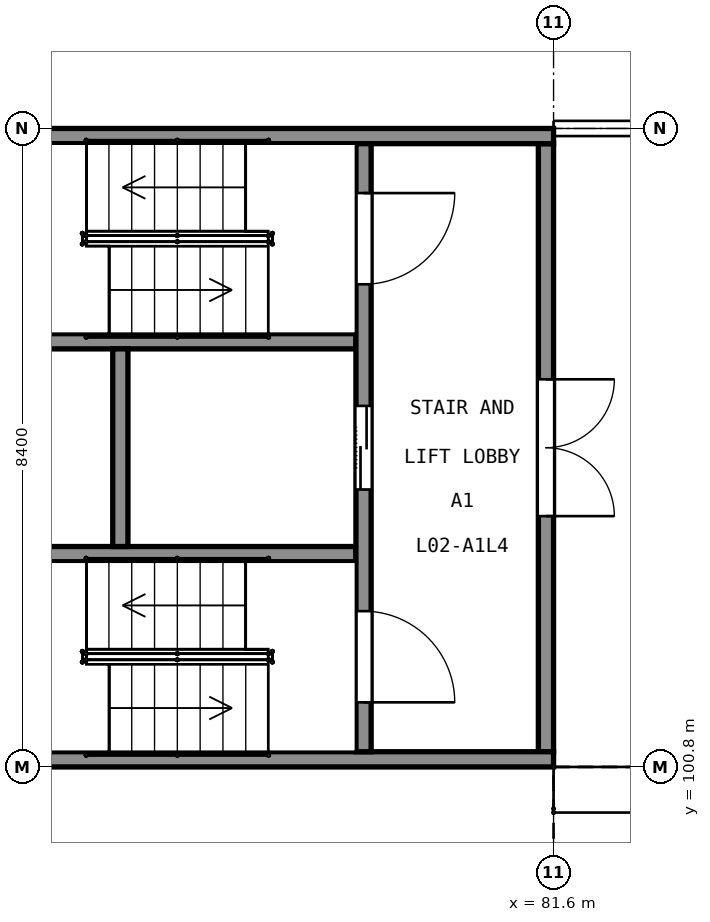
"""IFC4 building model, lengths in metres.
Left out: names, types, materials, properties, quantities, classifications, styles, units other than length and angle.
Written with IfcOpenShell. Run it as: python <this file> out.ifc"""

import sys

from ifc_helpers import new_model, si_unit, direction, frame, frame_2d, origin, place, context, subcontext, project, spatial, rectangle, extrude, element, fill, save


model = new_model("IFC4")
c1 = context("Model", 3, precision=1e-05, world=origin(), true_north=direction((0.0, 1.0)))
c2 = subcontext(c1, "Body", "Model", "MODEL_VIEW")
j1 = project(units=[si_unit("LENGTHUNIT", "METRE"), si_unit("PLANEANGLEUNIT", "RADIAN")], contexts=[c1])
p1 = place(None, origin())
s1 = spatial("IfcSite", under=j1, at=p1, CompositionType="ELEMENT")
p2 = place(p1, origin())
s2 = spatial("IfcBuilding", under=s1, at=p2, CompositionType="ELEMENT")
p3 = place(p2, frame((0.0, 0.0, 10.5)))
s3 = spatial("IfcBuildingStorey", under=s2, at=p3, CompositionType="ELEMENT", Elevation=10.5)
for number, where, z_axis, x_axis in (
    (1, (73.2, 100.9, 0.0), (0.0, 0.0, 1.0), (1.0, 0.0, 0.0)),
    (2, (73.2, 109.1, 0.0), (0.0, 0.0, 1.0), (1.0, 0.0, 0.0)),
):
    element("IfcWall", number, at=place(p3, frame(where, z_axis=z_axis, x_axis=x_axis)), inside=s3, PredefinedType="SHEAR", context=c2, shape_type="SweptSolid", body=[
        extrude(rectangle(XDim=8.4, YDim=0.2, at=frame_2d((4.2, 0.0))), origin(), (0.0, 0.0, 1.0), 9.5),
    ])
p4 = place(p3, frame((81.5, 101.0, 0.0), z_axis=(0.0, 0.0, 1.0), x_axis=(0.0, 1.0, 0.0)))
e3 = element("IfcWall", 3, at=p4, inside=s3, PredefinedType="SHEAR", context=c2, shape_type="SweptSolid", body=[
    extrude(rectangle(XDim=8.0, YDim=0.2, at=frame_2d((4.0, 0.0))), origin(), (0.0, 0.0, 1.0), 9.5),
])
p5 = place(p4, frame((3.1, 0.0, 0.0)))
e4 = element("IfcOpeningElement", 4, at=p5, cuts=e3, PredefinedType="OPENING", context=c2, shape_type="SweptSolid", body=[
    extrude(rectangle(XDim=1.8, YDim=2.1, at=frame_2d((0.9, 1.05))), frame((0.0, 0.11, 0.0), z_axis=(0.0, -1.0, 0.0), x_axis=(1.0, 0.0, 0.0)), (0.0, 0.0, 1.0), 0.22),
])
p6 = place(p3, frame((79.1, 101.0, 0.0), z_axis=(0.0, 0.0, 1.0), x_axis=(0.0, 1.0, 0.0)))
e5 = element("IfcWall", 5, at=p6, inside=s3, PredefinedType="SHEAR", context=c2, shape_type="SweptSolid", body=[
    extrude(rectangle(XDim=8.0, YDim=0.2, at=frame_2d((4.0, 0.0))), origin(), (0.0, 0.0, 1.0), 9.5),
])
p7 = place(p6, frame((0.65, 0.0, 0.0)))
e6 = element("IfcOpeningElement", 6, at=p7, cuts=e5, PredefinedType="OPENING", context=c2, shape_type="SweptSolid", body=[
    extrude(rectangle(XDim=1.2, YDim=2.1, at=frame_2d((0.6, 1.05))), frame((0.0, 0.11, 0.0), z_axis=(0.0, -1.0, 0.0), x_axis=(1.0, 0.0, 0.0)), (0.0, 0.0, 1.0), 0.22),
])
p8 = place(p6, frame((6.15, 0.0, 0.0)))
e7 = element("IfcOpeningElement", 7, at=p8, cuts=e5, PredefinedType="OPENING", context=c2, shape_type="SweptSolid", body=[
    extrude(rectangle(XDim=1.2, YDim=2.1, at=frame_2d((0.6, 1.05))), frame((0.0, 0.11, 0.0), z_axis=(0.0, -1.0, 0.0), x_axis=(1.0, 0.0, 0.0)), (0.0, 0.0, 1.0), 0.22),
])
p9 = place(p6, frame((3.45, 0.0, 0.0)))
e8 = element("IfcOpeningElement", 8, at=p9, cuts=e5, PredefinedType="OPENING", context=c2, shape_type="SweptSolid", body=[
    extrude(rectangle(XDim=1.1, YDim=2.1, at=frame_2d((0.55, 1.05))), frame((0.0, 0.11, 0.0), z_axis=(0.0, -1.0, 0.0), x_axis=(1.0, 0.0, 0.0)), (0.0, 0.0, 1.0), 0.22),
])
for number, where, z_axis, x_axis in (
    (9, (73.4, 103.6, 0.0), (0.0, 0.0, 1.0), (1.0, 0.0, 0.0)),
    (10, (73.4, 106.4, 0.0), (0.0, 0.0, 1.0), (1.0, 0.0, 0.0)),
):
    element("IfcWall", number, at=place(p3, frame(where, z_axis=z_axis, x_axis=x_axis)), inside=s3, PredefinedType="SHEAR", context=c2, shape_type="SweptSolid", body=[
        extrude(rectangle(XDim=5.6, YDim=0.2, at=frame_2d((2.8, 0.0))), origin(), (0.0, 0.0, 1.0), 9.5),
    ])
p10 = place(p3, frame((75.9, 103.7, 0.0), z_axis=(0.0, 0.0, 1.0), x_axis=(0.0, 1.0, 0.0)))
e11 = element("IfcWall", 11, at=p10, inside=s3, PredefinedType="SHEAR", context=c2, shape_type="SweptSolid", body=[
    extrude(rectangle(XDim=2.6, YDim=0.2, at=frame_2d((1.3, 0.0))), origin(), (0.0, 0.0, 1.0), 9.5),
])
p11 = place(p5, origin())
e12 = element("IfcDoor", 12, at=p11, inside=s3, OperationType="DOUBLE_DOOR_SINGLE_SWING", PredefinedType="DOOR", context=c2, shape_type="SweptSolid", body=[
    extrude(rectangle(XDim=1.8, YDim=2.1, at=frame_2d((0.9, 1.05))), frame((0.0, 0.025, 0.0), z_axis=(0.0, -1.0, 0.0), x_axis=(1.0, 0.0, 0.0)), (0.0, 0.0, 1.0), 0.05),
])
fill(e4, e12)
p12 = place(p7, origin())
e13 = element("IfcDoor", 13, at=p12, inside=s3, OperationType="SINGLE_SWING_LEFT", PredefinedType="DOOR", context=c2, shape_type="SweptSolid", body=[
    extrude(rectangle(XDim=1.2, YDim=2.1, at=frame_2d((0.6, 1.05))), frame((0.0, 0.025, 0.0), z_axis=(0.0, -1.0, 0.0), x_axis=(1.0, 0.0, 0.0)), (0.0, 0.0, 1.0), 0.05),
])
fill(e6, e13)
p13 = place(p8, origin())
e14 = element("IfcDoor", 14, at=p13, inside=s3, OperationType="SINGLE_SWING_RIGHT", PredefinedType="DOOR", context=c2, shape_type="SweptSolid", body=[
    extrude(rectangle(XDim=1.2, YDim=2.1, at=frame_2d((0.6, 1.05))), frame((0.0, 0.025, 0.0), z_axis=(0.0, -1.0, 0.0), x_axis=(1.0, 0.0, 0.0)), (0.0, 0.0, 1.0), 0.05),
])
fill(e7, e14)
p14 = place(p9, origin())
e15 = element("IfcDoor", 15, at=p14, inside=s3, OperationType="DOUBLE_DOOR_SLIDING", PredefinedType="DOOR", context=c2, shape_type="SweptSolid", body=[
    extrude(rectangle(XDim=1.1, YDim=2.1, at=frame_2d((0.55, 1.05))), frame((0.0, 0.025, 0.0), z_axis=(0.0, -1.0, 0.0), x_axis=(1.0, 0.0, 0.0)), (0.0, 0.0, 1.0), 0.05),
])
fill(e8, e15)
save(model, sys.argv[1])
